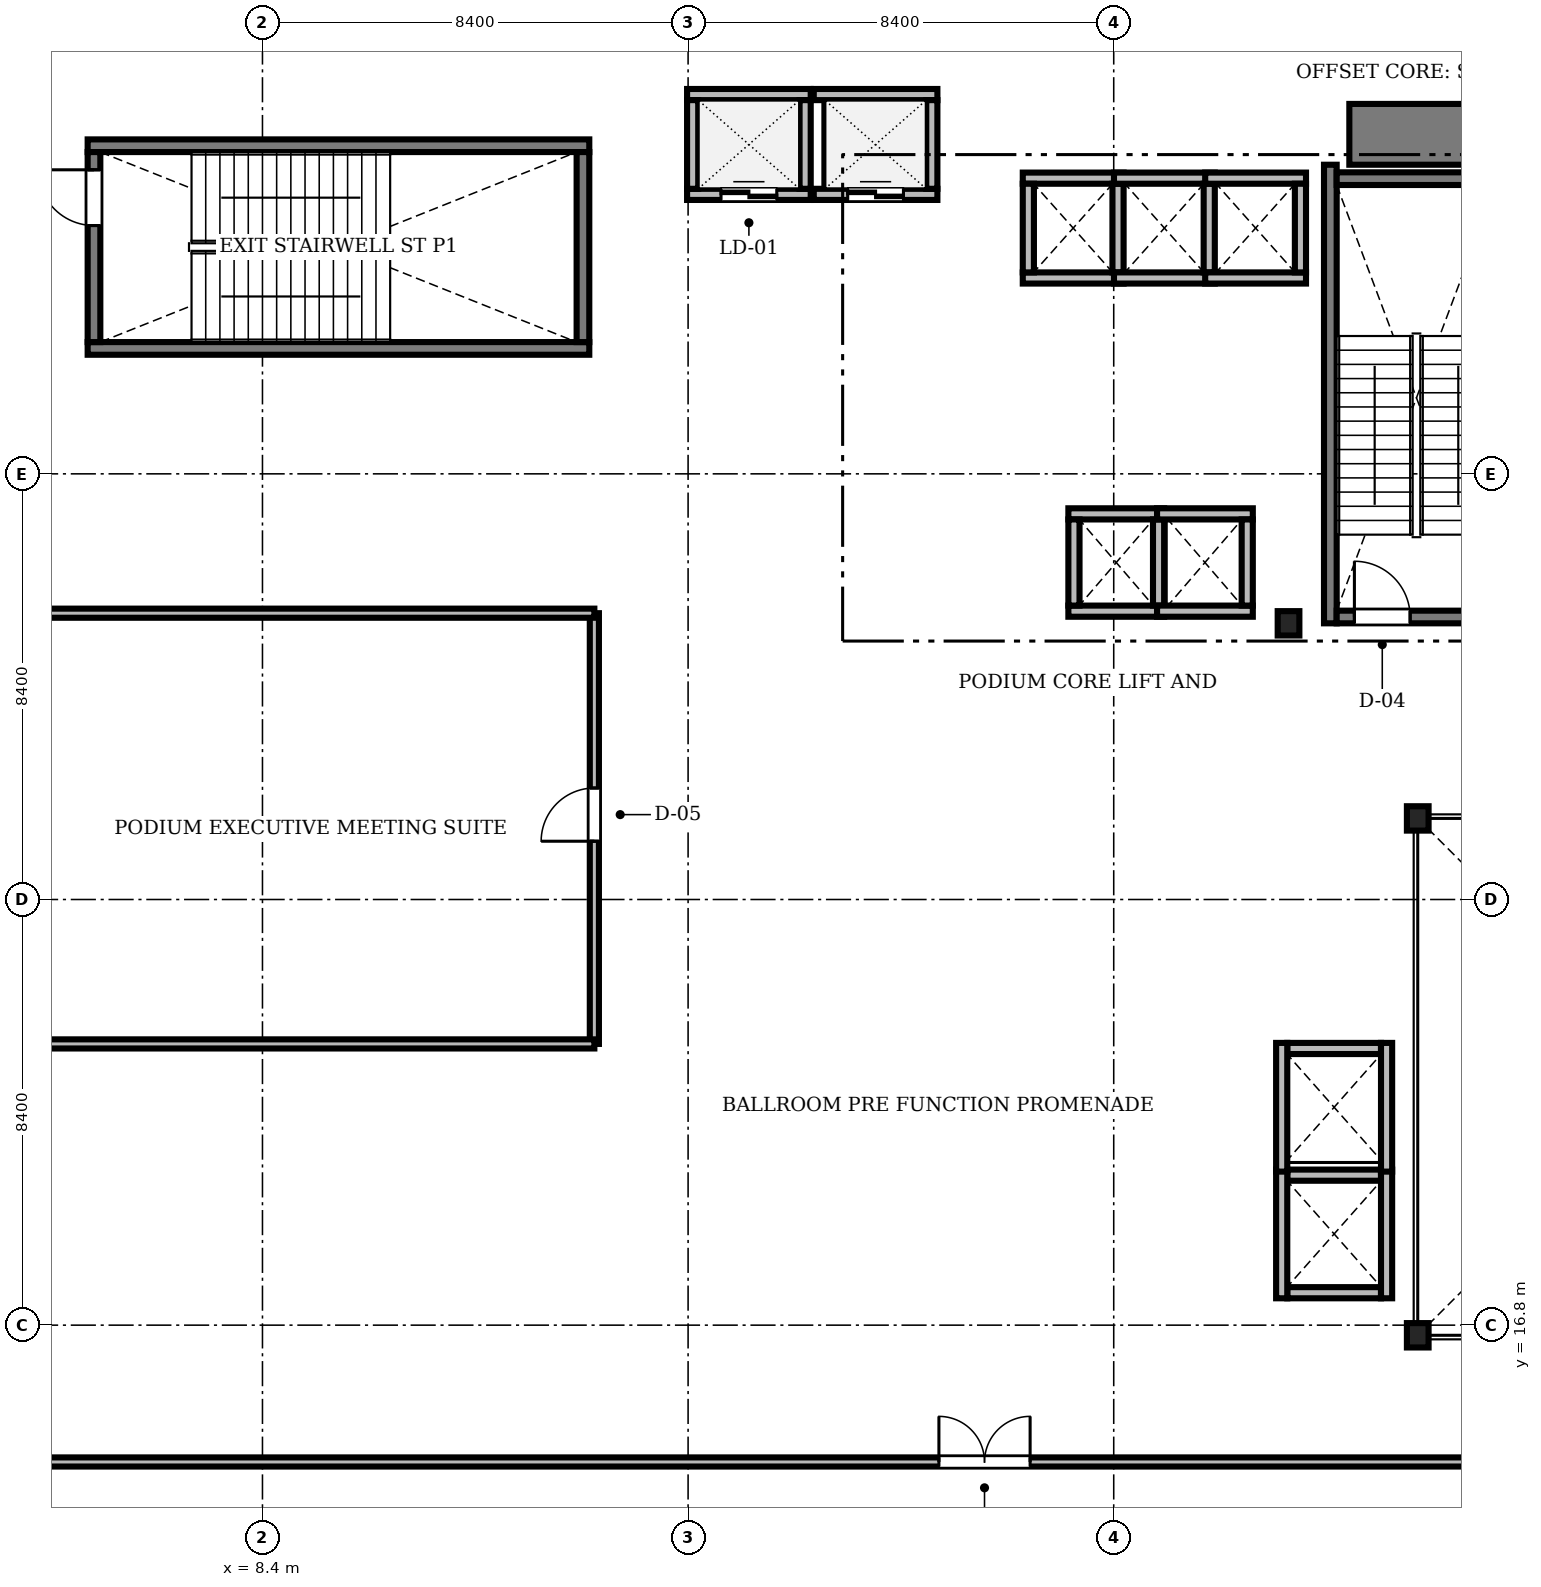
"""IFC4 building model, lengths in metres.
Left out: names, types, materials, properties, quantities, classifications, styles, units other than length and angle.
Written with IfcOpenShell. Run it as: python <this file> out.ifc"""

import sys

from ifc_helpers import new_model, si_unit, direction, frame, frame_2d, origin, origin_2d, place, context, subcontext, project, spatial, rectangle, i_section, extrude, source, transform, mapped, element, fill, save


model = new_model("IFC4")
c1 = context("Model", 3, precision=1e-05, world=origin(), true_north=direction((0.0, 1.0)))
c2 = subcontext(c1, "Body", "Model", "MODEL_VIEW")
j1 = project(units=[si_unit("LENGTHUNIT", "METRE"), si_unit("PLANEANGLEUNIT", "RADIAN")], contexts=[c1])
p1 = place(None, origin())
s1 = spatial("IfcSite", under=j1, at=p1, CompositionType="ELEMENT")
p2 = place(p1, origin())
s2 = spatial("IfcBuilding", under=s1, at=p2, CompositionType="ELEMENT")
p3 = place(p2, frame((0.0, 0.0, 17.0)))
s3 = spatial("IfcBuildingStorey", under=s2, at=p3, CompositionType="ELEMENT", Elevation=17.0)
m1 = source(origin(), c2, "Body", "SweptSolid", [
    extrude(rectangle(XDim=17.52, YDim=1.2, at=frame_2d((8.76, 0.0))), origin(), (0.0, 0.0, 1.0), 5.08),
])
p4 = place(p3, frame((29.85, 40.3, 0.0), z_axis=(0.0, 0.0, 1.0), x_axis=(1.0, 0.0, 0.0)))
e1 = element("IfcWall", 1, at=p4, inside=s3, PredefinedType="SHEAR", context=c2, shape_type="MappedRepresentation", body=[
    mapped(m1, transform((0.0, 0.0, 0.0), scale=1.0)),
])
m2 = source(origin(), c2, "Body", "SweptSolid", [
    extrude(i_section(OverallWidth=0.428, OverallDepth=0.481, WebThickness=0.04, FlangeThickness=0.063, FilletRadius=0.015, at=origin_2d()), origin(), (0.0, 0.0, 1.0), 5.08),
])
for number, where, z_axis, x_axis in (
    (2, (31.2, 16.6, 0.0), (0.0, 0.0, 1.0), (1.0, 0.0, 0.0)),
    (3, (31.2, 26.8, 0.0), (0.0, 0.0, 1.0), (1.0, 0.0, 0.0)),
    (4, (28.65, 30.65, 0.0), (0.0, 0.0, 1.0), (1.0, 0.0, 0.0)),
):
    element("IfcColumn", number, at=place(p3, frame(where, z_axis=z_axis, x_axis=x_axis)), inside=s3, PredefinedType="COLUMN", context=c2, shape_type="MappedRepresentation", body=[
        mapped(m2, transform((0.0, 0.0, 0.0), scale=1.0)),
    ])
m3 = source(origin(), c2, "Body", "SweptSolid", [
    extrude(rectangle(XDim=9.05, YDim=0.25, at=frame_2d((4.525, 0.0))), origin(), (0.0, 0.0, 1.0), 5.2),
])
p5 = place(p3, frame((29.475, 30.65, 0.0), z_axis=(0.0, 0.0, 1.0), x_axis=(0.0, 1.0, 0.0)))
e5 = element("IfcWall", 5, at=p5, inside=s3, PredefinedType="SOLIDWALL", context=c2, shape_type="MappedRepresentation", body=[
    mapped(m3, transform((0.0, 0.0, 0.0), scale=1.0)),
])
m4 = source(origin(), c2, "Body", "SweptSolid", [
    extrude(rectangle(XDim=3.15, YDim=0.25, at=frame_2d((1.575, 0.0))), origin(), (0.0, 0.0, 1.0), 5.2),
])
p6 = place(p3, frame((29.6, 39.425, 0.0), z_axis=(0.0, 0.0, 1.0), x_axis=(1.0, 0.0, 0.0)))
e6 = element("IfcWall", 6, at=p6, inside=s3, PredefinedType="SOLIDWALL", context=c2, shape_type="MappedRepresentation", body=[
    mapped(m4, transform((0.0, 0.0, 0.0), scale=1.0)),
])
p7 = place(p3, frame((29.6, 30.775, 0.0), z_axis=(0.0, 0.0, 1.0), x_axis=(1.0, 0.0, 0.0)))
e7 = element("IfcWall", 7, at=p7, inside=s3, PredefinedType="SOLIDWALL", context=c2, shape_type="MappedRepresentation", body=[
    mapped(m4, transform((0.0, 0.0, 0.0), scale=1.0)),
])
m5 = source(origin(), c2, "Body", "SweptSolid", [
    extrude(rectangle(XDim=1.1, YDim=2.2, at=frame_2d((0.55, 1.1))), frame((0.0, 0.135, 0.0), z_axis=(0.0, -1.0, 0.0), x_axis=(1.0, 0.0, 0.0)), (0.0, 0.0, 1.0), 0.27),
])
p8 = place(p7, frame((0.35, 0.0, 0.0)))
e8 = element("IfcOpeningElement", 8, at=p8, cuts=e7, PredefinedType="OPENING", context=c2, shape_type="MappedRepresentation", body=[
    mapped(m5, transform((0.0, 0.0, 0.0), scale=1.0)),
])
m6 = source(origin(), c2, "Body", "SweptSolid", [
    extrude(rectangle(XDim=9.9, YDim=0.25, at=frame_2d((4.95, 0.0))), origin(), (0.0, 0.0, 1.0), 5.2),
])
for number, where, z_axis, x_axis in (
    (9, (4.95, 36.075, 0.0), (0.0, 0.0, 1.0), (1.0, 0.0, 0.0)),
    (10, (4.95, 40.075, 0.0), (0.0, 0.0, 1.0), (1.0, 0.0, 0.0)),
):
    element("IfcWall", number, at=place(p3, frame(where, z_axis=z_axis, x_axis=x_axis)), inside=s3, PredefinedType="SOLIDWALL", context=c2, shape_type="MappedRepresentation", body=[
        mapped(m6, transform((0.0, 0.0, 0.0), scale=1.0)),
    ])
m7 = source(origin(), c2, "Body", "SweptSolid", [
    extrude(rectangle(XDim=3.75, YDim=0.25, at=frame_2d((1.875, 0.0))), origin(), (0.0, 0.0, 1.0), 5.2),
])
p9 = place(p3, frame((14.725, 36.2, 0.0), z_axis=(0.0, 0.0, 1.0), x_axis=(0.0, 1.0, 0.0)))
e11 = element("IfcWall", 11, at=p9, inside=s3, PredefinedType="SOLIDWALL", context=c2, shape_type="MappedRepresentation", body=[
    mapped(m7, transform((0.0, 0.0, 0.0), scale=1.0)),
])
p10 = place(p3, frame((5.075, 36.2, 0.0), z_axis=(0.0, 0.0, 1.0), x_axis=(0.0, 1.0, 0.0)))
e12 = element("IfcWall", 12, at=p10, inside=s3, PredefinedType="SOLIDWALL", context=c2, shape_type="MappedRepresentation", body=[
    mapped(m7, transform((0.0, 0.0, 0.0), scale=1.0)),
])
p11 = place(p10, frame((2.3, 0.0, 0.0)))
e13 = element("IfcOpeningElement", 13, at=p11, cuts=e12, PredefinedType="OPENING", context=c2, shape_type="MappedRepresentation", body=[
    mapped(m5, transform((0.0, 0.0, 0.0), scale=1.0)),
])
m8 = source(origin(), c2, "Body", "SweptSolid", [
    extrude(rectangle(XDim=2.44, YDim=0.22, at=frame_2d((1.22, 0.0))), origin(), (0.0, 0.0, 1.0), 5.08),
])
p12 = place(p3, frame((16.78, 39.115, 0.0), z_axis=(0.0, 0.0, 1.0), x_axis=(1.0, 0.0, 0.0)))
e14 = element("IfcWall", 14, at=p12, inside=s3, PredefinedType="SOLIDWALL", context=c2, shape_type="MappedRepresentation", body=[
    mapped(m8, transform((0.0, 0.0, 0.0), scale=1.0)),
])
m9 = source(origin(), c2, "Body", "SweptSolid", [
    extrude(rectangle(XDim=1.1, YDim=2.2, at=frame_2d((0.55, 1.1))), frame((0.0, 0.12, 0.0), z_axis=(0.0, -1.0, 0.0), x_axis=(1.0, 0.0, 0.0)), (0.0, 0.0, 1.0), 0.24),
])
p13 = place(p12, frame((0.67, 0.0, 0.0)))
e15 = element("IfcOpeningElement", 15, at=p13, cuts=e14, PredefinedType="OPENING", context=c2, shape_type="MappedRepresentation", body=[
    mapped(m9, transform((0.0, 0.0, 0.0), scale=1.0)),
])
p14 = place(p3, frame((16.78, 41.085, 0.0), z_axis=(0.0, 0.0, 1.0), x_axis=(1.0, 0.0, 0.0)))
e16 = element("IfcWall", 16, at=p14, inside=s3, PredefinedType="SOLIDWALL", context=c2, shape_type="MappedRepresentation", body=[
    mapped(m8, transform((0.0, 0.0, 0.0), scale=1.0)),
])
m10 = source(origin(), c2, "Body", "SweptSolid", [
    extrude(rectangle(XDim=1.75, YDim=0.22, at=frame_2d((0.875, 0.0))), origin(), (0.0, 0.0, 1.0), 5.08),
])
for number, where, z_axis, x_axis in (
    (17, (16.89, 39.225, 0.0), (0.0, 0.0, 1.0), (0.0, 1.0, 0.0)),
    (18, (19.11, 39.225, 0.0), (0.0, 0.0, 1.0), (0.0, 1.0, 0.0)),
):
    element("IfcWall", number, at=place(p3, frame(where, z_axis=z_axis, x_axis=x_axis)), inside=s3, PredefinedType="SOLIDWALL", context=c2, shape_type="MappedRepresentation", body=[
        mapped(m10, transform((0.0, 0.0, 0.0), scale=1.0)),
    ])
p15 = place(p3, frame((19.28, 39.115, 0.0), z_axis=(0.0, 0.0, 1.0), x_axis=(1.0, 0.0, 0.0)))
e19 = element("IfcWall", 19, at=p15, inside=s3, PredefinedType="SOLIDWALL", context=c2, shape_type="MappedRepresentation", body=[
    mapped(m8, transform((0.0, 0.0, 0.0), scale=1.0)),
])
p16 = place(p15, frame((0.67, 0.0, 0.0)))
e20 = element("IfcOpeningElement", 20, at=p16, cuts=e19, PredefinedType="OPENING", context=c2, shape_type="MappedRepresentation", body=[
    mapped(m9, transform((0.0, 0.0, 0.0), scale=1.0)),
])
p17 = place(p3, frame((19.28, 41.085, 0.0), z_axis=(0.0, 0.0, 1.0), x_axis=(1.0, 0.0, 0.0)))
e21 = element("IfcWall", 21, at=p17, inside=s3, PredefinedType="SOLIDWALL", context=c2, shape_type="MappedRepresentation", body=[
    mapped(m8, transform((0.0, 0.0, 0.0), scale=1.0)),
])
p18 = place(p3, frame((21.61, 39.225, 0.0), z_axis=(0.0, 0.0, 1.0), x_axis=(0.0, 1.0, 0.0)))
e22 = element("IfcWall", 22, at=p18, inside=s3, PredefinedType="SOLIDWALL", context=c2, shape_type="MappedRepresentation", body=[
    mapped(m10, transform((0.0, 0.0, 0.0), scale=1.0)),
])
m11 = source(origin(), c2, "Body", "SweptSolid", [
    extrude(rectangle(XDim=1.99, YDim=0.22, at=frame_2d((0.995, 0.0))), origin(), (0.0, 0.0, 1.0), 5.08),
])
for number, where, z_axis, x_axis in (
    (23, (23.405, 37.465, 0.0), (0.0, 0.0, 1.0), (1.0, 0.0, 0.0)),
    (24, (23.405, 39.435, 0.0), (0.0, 0.0, 1.0), (1.0, 0.0, 0.0)),
):
    element("IfcWall", number, at=place(p3, frame(where, z_axis=z_axis, x_axis=x_axis)), inside=s3, PredefinedType="SOLIDWALL", context=c2, shape_type="MappedRepresentation", body=[
        mapped(m11, transform((0.0, 0.0, 0.0), scale=1.0)),
    ])
for number, where, z_axis, x_axis in (
    (25, (23.515, 37.575, 0.0), (0.0, 0.0, 1.0), (0.0, 1.0, 0.0)),
    (26, (25.285, 37.575, 0.0), (0.0, 0.0, 1.0), (0.0, 1.0, 0.0)),
):
    element("IfcWall", number, at=place(p3, frame(where, z_axis=z_axis, x_axis=x_axis)), inside=s3, PredefinedType="SOLIDWALL", context=c2, shape_type="MappedRepresentation", body=[
        mapped(m10, transform((0.0, 0.0, 0.0), scale=1.0)),
    ])
for number, where, z_axis, x_axis in (
    (27, (25.205, 37.465, 0.0), (0.0, 0.0, 1.0), (1.0, 0.0, 0.0)),
    (28, (25.205, 39.435, 0.0), (0.0, 0.0, 1.0), (1.0, 0.0, 0.0)),
):
    element("IfcWall", number, at=place(p3, frame(where, z_axis=z_axis, x_axis=x_axis)), inside=s3, PredefinedType="SOLIDWALL", context=c2, shape_type="MappedRepresentation", body=[
        mapped(m11, transform((0.0, 0.0, 0.0), scale=1.0)),
    ])
p19 = place(p3, frame((27.085, 37.575, 0.0), z_axis=(0.0, 0.0, 1.0), x_axis=(0.0, 1.0, 0.0)))
e29 = element("IfcWall", 29, at=p19, inside=s3, PredefinedType="SOLIDWALL", context=c2, shape_type="MappedRepresentation", body=[
    mapped(m10, transform((0.0, 0.0, 0.0), scale=1.0)),
])
m12 = source(origin(), c2, "Body", "SweptSolid", [
    extrude(rectangle(XDim=1.99, YDim=0.22, at=frame_2d((0.995, 0.0))), origin(), (0.0, 0.0, 1.0), 5.08),
])
for number, where, z_axis, x_axis in (
    (30, (27.005, 37.465, 0.0), (0.0, 0.0, 1.0), (1.0, 0.0, 0.0)),
    (31, (27.005, 39.435, 0.0), (0.0, 0.0, 1.0), (1.0, 0.0, 0.0)),
):
    element("IfcWall", number, at=place(p3, frame(where, z_axis=z_axis, x_axis=x_axis)), inside=s3, PredefinedType="SOLIDWALL", context=c2, shape_type="MappedRepresentation", body=[
        mapped(m12, transform((0.0, 0.0, 0.0), scale=1.0)),
    ])
p20 = place(p3, frame((28.885, 37.575, 0.0), z_axis=(0.0, 0.0, 1.0), x_axis=(0.0, 1.0, 0.0)))
e32 = element("IfcWall", 32, at=p20, inside=s3, PredefinedType="SOLIDWALL", context=c2, shape_type="MappedRepresentation", body=[
    mapped(m10, transform((0.0, 0.0, 0.0), scale=1.0)),
])
m13 = source(origin(), c2, "Body", "SweptSolid", [
    extrude(rectangle(XDim=1.89, YDim=0.22, at=frame_2d((0.945, 0.0))), origin(), (0.0, 0.0, 1.0), 5.08),
])
for number, where, z_axis, x_axis in (
    (33, (24.305, 30.89, 0.0), (0.0, 0.0, 1.0), (1.0, 0.0, 0.0)),
    (34, (24.305, 32.81, 0.0), (0.0, 0.0, 1.0), (1.0, 0.0, 0.0)),
):
    element("IfcWall", number, at=place(p3, frame(where, z_axis=z_axis, x_axis=x_axis)), inside=s3, PredefinedType="SOLIDWALL", context=c2, shape_type="MappedRepresentation", body=[
        mapped(m13, transform((0.0, 0.0, 0.0), scale=1.0)),
    ])
m14 = source(origin(), c2, "Body", "SweptSolid", [
    extrude(rectangle(XDim=1.7, YDim=0.22, at=frame_2d((0.85, 0.0))), origin(), (0.0, 0.0, 1.0), 5.08),
])
for number, where, z_axis, x_axis in (
    (35, (24.415, 31.0, 0.0), (0.0, 0.0, 1.0), (0.0, 1.0, 0.0)),
    (36, (26.085, 31.0, 0.0), (0.0, 0.0, 1.0), (0.0, 1.0, 0.0)),
):
    element("IfcWall", number, at=place(p3, frame(where, z_axis=z_axis, x_axis=x_axis)), inside=s3, PredefinedType="SOLIDWALL", context=c2, shape_type="MappedRepresentation", body=[
        mapped(m14, transform((0.0, 0.0, 0.0), scale=1.0)),
    ])
for number, where, z_axis, x_axis in (
    (37, (26.055, 30.89, 0.0), (0.0, 0.0, 1.0), (1.0, 0.0, 0.0)),
    (38, (26.055, 32.81, 0.0), (0.0, 0.0, 1.0), (1.0, 0.0, 0.0)),
):
    element("IfcWall", number, at=place(p3, frame(where, z_axis=z_axis, x_axis=x_axis)), inside=s3, PredefinedType="SOLIDWALL", context=c2, shape_type="MappedRepresentation", body=[
        mapped(m13, transform((0.0, 0.0, 0.0), scale=1.0)),
    ])
p21 = place(p3, frame((27.835, 31.0, 0.0), z_axis=(0.0, 0.0, 1.0), x_axis=(0.0, 1.0, 0.0)))
e39 = element("IfcWall", 39, at=p21, inside=s3, PredefinedType="SOLIDWALL", context=c2, shape_type="MappedRepresentation", body=[
    mapped(m14, transform((0.0, 0.0, 0.0), scale=1.0)),
])
m15 = source(origin(), c2, "Body", "SweptSolid", [
    extrude(rectangle(XDim=1.85, YDim=0.22, at=frame_2d((0.925, 0.0))), origin(), (0.0, 0.0, 1.0), 5.08),
])
for number, where, z_axis, x_axis in (
    (40, (28.625, 17.44, 0.0), (0.0, 0.0, 1.0), (1.0, 0.0, 0.0)),
    (41, (28.625, 19.76, 0.0), (0.0, 0.0, 1.0), (1.0, 0.0, 0.0)),
):
    element("IfcWall", number, at=place(p3, frame(where, z_axis=z_axis, x_axis=x_axis)), inside=s3, PredefinedType="SOLIDWALL", context=c2, shape_type="MappedRepresentation", body=[
        mapped(m15, transform((0.0, 0.0, 0.0), scale=1.0)),
    ])
m16 = source(origin(), c2, "Body", "SweptSolid", [
    extrude(rectangle(XDim=2.54, YDim=0.22, at=frame_2d((1.27, 0.0))), origin(), (0.0, 0.0, 1.0), 5.08),
])
for number, where, z_axis, x_axis in (
    (42, (28.515, 17.33, 0.0), (0.0, 0.0, 1.0), (0.0, 1.0, 0.0)),
    (43, (30.585, 17.33, 0.0), (0.0, 0.0, 1.0), (0.0, 1.0, 0.0)),
):
    element("IfcWall", number, at=place(p3, frame(where, z_axis=z_axis, x_axis=x_axis)), inside=s3, PredefinedType="SOLIDWALL", context=c2, shape_type="MappedRepresentation", body=[
        mapped(m16, transform((0.0, 0.0, 0.0), scale=1.0)),
    ])
p22 = place(p3, frame((28.625, 22.26, 0.0), z_axis=(0.0, 0.0, 1.0), x_axis=(1.0, 0.0, 0.0)))
e44 = element("IfcWall", 44, at=p22, inside=s3, PredefinedType="SOLIDWALL", context=c2, shape_type="MappedRepresentation", body=[
    mapped(m15, transform((0.0, 0.0, 0.0), scale=1.0)),
])
for number, where, z_axis, x_axis in (
    (45, (28.515, 19.83, 0.0), (0.0, 0.0, 1.0), (0.0, 1.0, 0.0)),
    (46, (30.585, 19.83, 0.0), (0.0, 0.0, 1.0), (0.0, 1.0, 0.0)),
):
    element("IfcWall", number, at=place(p3, frame(where, z_axis=z_axis, x_axis=x_axis)), inside=s3, PredefinedType="SOLIDWALL", context=c2, shape_type="MappedRepresentation", body=[
        mapped(m16, transform((0.0, 0.0, 0.0), scale=1.0)),
    ])
m17 = source(origin(), c2, "Body", "SweptSolid", [
    extrude(rectangle(XDim=38.25, YDim=0.18, at=frame_2d((19.125, 0.0))), origin(), (0.0, 0.0, 1.0), 5.08),
])
p23 = place(p3, frame((3.75, 14.1, 0.0), z_axis=(0.0, 0.0, 1.0), x_axis=(1.0, 0.0, 0.0)))
e47 = element("IfcWall", 47, at=p23, inside=s3, PredefinedType="PARTITIONING", context=c2, shape_type="MappedRepresentation", body=[
    mapped(m17, transform((0.0, 0.0, 0.0), scale=1.0)),
])
m18 = source(origin(), c2, "Body", "SweptSolid", [
    extrude(rectangle(XDim=1.8, YDim=2.4, at=frame_2d((0.9, 1.2))), frame((0.0, 0.1, 0.0), z_axis=(0.0, -1.0, 0.0), x_axis=(1.0, 0.0, 0.0)), (0.0, 0.0, 1.0), 0.2),
])
p24 = place(p23, frame((18.0, 0.0, 0.0)))
e48 = element("IfcOpeningElement", 48, at=p24, cuts=e47, PredefinedType="OPENING", context=c2, shape_type="MappedRepresentation", body=[
    mapped(m18, transform((0.0, 0.0, 0.0), scale=1.0)),
])
m19 = source(origin(), c2, "Body", "SweptSolid", [
    extrude(rectangle(XDim=8.5, YDim=0.18, at=frame_2d((4.25, 0.0))), origin(), (0.0, 0.0, 1.0), 5.08),
])
p25 = place(p3, frame((14.95, 22.35, 0.0), z_axis=(0.0, 0.0, 1.0), x_axis=(0.0, 1.0, 0.0)))
e49 = element("IfcWall", 49, at=p25, inside=s3, PredefinedType="PARTITIONING", context=c2, shape_type="MappedRepresentation", body=[
    mapped(m19, transform((0.0, 0.0, 0.0), scale=1.0)),
])
m20 = source(origin(), c2, "Body", "SweptSolid", [
    extrude(rectangle(XDim=1.05, YDim=2.2, at=frame_2d((0.525, 1.1))), frame((0.0, 0.1, 0.0), z_axis=(0.0, -1.0, 0.0), x_axis=(1.0, 0.0, 0.0)), (0.0, 0.0, 1.0), 0.2),
])
p26 = place(p25, frame((4.0, 0.0, 0.0)))
e50 = element("IfcOpeningElement", 50, at=p26, cuts=e49, PredefinedType="OPENING", context=c2, shape_type="MappedRepresentation", body=[
    mapped(m20, transform((0.0, 0.0, 0.0), scale=1.0)),
])
m21 = source(origin(), c2, "Body", "SweptSolid", [
    extrude(rectangle(XDim=11.2, YDim=0.18, at=frame_2d((5.6, 0.0))), origin(), (0.0, 0.0, 1.0), 5.08),
])
for number, where, z_axis, x_axis in (
    (51, (3.75, 22.35, 0.0), (0.0, 0.0, 1.0), (1.0, 0.0, 0.0)),
    (52, (3.75, 30.85, 0.0), (0.0, 0.0, 1.0), (1.0, 0.0, 0.0)),
):
    element("IfcWall", number, at=place(p3, frame(where, z_axis=z_axis, x_axis=x_axis)), inside=s3, PredefinedType="PARTITIONING", context=c2, shape_type="MappedRepresentation", body=[
        mapped(m21, transform((0.0, 0.0, 0.0), scale=1.0)),
    ])
m22 = source(origin(), c2, "Body", "SweptSolid", [
    extrude(rectangle(XDim=1.1, YDim=2.2, at=frame_2d((0.55, 1.1))), frame((0.0, 0.025, 0.0), z_axis=(0.0, -1.0, 0.0), x_axis=(1.0, 0.0, 0.0)), (0.0, 0.0, 1.0), 0.05),
])
p27 = place(p8, origin())
e53 = element("IfcDoor", 53, at=p27, inside=s3, OperationType="SINGLE_SWING_LEFT", PredefinedType="DOOR", context=c2, shape_type="MappedRepresentation", body=[
    mapped(m22, transform((0.0, 0.0, 0.0), scale=1.0)),
])
fill(e8, e53)
p28 = place(p11, origin())
e54 = element("IfcDoor", 54, at=p28, inside=s3, OperationType="SINGLE_SWING_RIGHT", PredefinedType="DOOR", context=c2, shape_type="MappedRepresentation", body=[
    mapped(m22, transform((0.0, 0.0, 0.0), scale=1.0)),
])
fill(e13, e54)
p29 = place(p13, origin())
e55 = element("IfcDoor", 55, at=p29, inside=s3, OperationType="DOUBLE_DOOR_SLIDING", PredefinedType="DOOR", context=c2, shape_type="MappedRepresentation", body=[
    mapped(m22, transform((0.0, 0.0, 0.0), scale=1.0)),
])
fill(e15, e55)
p30 = place(p16, origin())
e56 = element("IfcDoor", 56, at=p30, inside=s3, OperationType="DOUBLE_DOOR_SLIDING", PredefinedType="DOOR", context=c2, shape_type="MappedRepresentation", body=[
    mapped(m22, transform((0.0, 0.0, 0.0), scale=1.0)),
])
fill(e20, e56)
m23 = source(origin(), c2, "Body", "SweptSolid", [
    extrude(rectangle(XDim=1.8, YDim=2.4, at=frame_2d((0.9, 1.2))), frame((0.0, 0.025, 0.0), z_axis=(0.0, -1.0, 0.0), x_axis=(1.0, 0.0, 0.0)), (0.0, 0.0, 1.0), 0.05),
])
p31 = place(p24, origin())
e57 = element("IfcDoor", 57, at=p31, inside=s3, OperationType="DOUBLE_DOOR_SINGLE_SWING", PredefinedType="DOOR", context=c2, shape_type="MappedRepresentation", body=[
    mapped(m23, transform((0.0, 0.0, 0.0), scale=1.0)),
])
fill(e48, e57)
m24 = source(origin(), c2, "Body", "SweptSolid", [
    extrude(rectangle(XDim=1.05, YDim=2.2, at=frame_2d((0.525, 1.1))), frame((0.0, 0.025, 0.0), z_axis=(0.0, -1.0, 0.0), x_axis=(1.0, 0.0, 0.0)), (0.0, 0.0, 1.0), 0.05),
])
p32 = place(p26, origin())
e58 = element("IfcDoor", 58, at=p32, inside=s3, OperationType="SINGLE_SWING_LEFT", PredefinedType="DOOR", context=c2, shape_type="MappedRepresentation", body=[
    mapped(m24, transform((0.0, 0.0, 0.0), scale=1.0)),
])
fill(e50, e58)
save(model, sys.argv[1])
